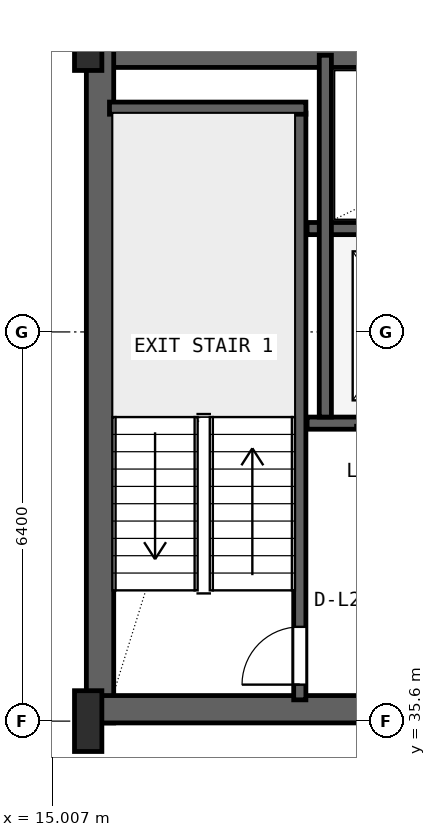
"""IFC4 building model, lengths in metres.
Left out: names, types, materials, properties, quantities, classifications, styles, units other than length and angle.
Written with IfcOpenShell. Run it as: python <this file> out.ifc"""

import sys

from ifc_helpers import new_model, si_unit, direction, frame, frame_2d, origin, origin_2d, place, context, subcontext, project, spatial, rectangle, i_section, extrude, source, transform, mapped, element, fill, save


model = new_model("IFC4")
c1 = context("Model", 3, precision=1e-05, world=origin(), true_north=direction((0.0, 1.0)))
c2 = subcontext(c1, "Body", "Model", "MODEL_VIEW")
j1 = project(units=[si_unit("LENGTHUNIT", "METRE"), si_unit("PLANEANGLEUNIT", "RADIAN")], contexts=[c1])
p1 = place(None, origin())
s1 = spatial("IfcSite", under=j1, at=p1, CompositionType="ELEMENT")
p2 = place(p1, origin())
s2 = spatial("IfcBuilding", under=s1, at=p2, CompositionType="ELEMENT")
p3 = place(p2, frame((0.0, 0.0, 90.8)))
s3 = spatial("IfcBuildingStorey", under=s2, at=p3, CompositionType="ELEMENT", Elevation=90.8)
p4 = place(p3, frame((15.6, 46.575, 0.0), z_axis=(0.0, 0.0, 1.0), x_axis=(1.0, 0.0, 0.0)))
e1 = element("IfcWall", 1, at=p4, inside=s3, PredefinedType="SHEAR", context=c2, shape_type="SweptSolid", body=[
    extrude(rectangle(XDim=36.8, YDim=0.45, at=frame_2d((18.4, 0.0))), origin(), (0.0, 0.0, 1.0), 3.55),
])
p5 = place(p3, frame((15.795, 35.57, 0.0), z_axis=(0.0, 0.0, 1.0), x_axis=(0.0, 1.0, 0.0)))
e2 = element("IfcWall", 2, at=p5, inside=s3, PredefinedType="SHEAR", context=c2, shape_type="SweptSolid", body=[
    extrude(rectangle(XDim=11.23, YDim=0.45, at=frame_2d((5.615, 0.0))), origin(), (0.0, 0.0, 1.0), 3.55),
])
p6 = place(p3, frame((15.57, 35.795, 0.0), z_axis=(0.0, 0.0, 1.0), x_axis=(1.0, 0.0, 0.0)))
e3 = element("IfcWall", 3, at=p6, inside=s3, PredefinedType="SHEAR", context=c2, shape_type="SweptSolid", body=[
    extrude(rectangle(XDim=9.23, YDim=0.45, at=frame_2d((4.615, 0.0))), origin(), (0.0, 0.0, 1.0), 3.55),
])
p7 = place(p6, frame((5.4, 0.0, 0.0)))
e4 = element("IfcOpeningElement", 4, at=p7, cuts=e3, PredefinedType="OPENING", context=c2, shape_type="SweptSolid", body=[
    extrude(rectangle(XDim=1.0, YDim=2.1, at=frame_2d((0.5, 1.05))), frame((0.0, 0.235, 0.0), z_axis=(0.0, -1.0, 0.0), x_axis=(1.0, 0.0, 0.0)), (0.0, 0.0, 1.0), 0.47),
])
m1 = source(origin(), c2, "Body", "SweptSolid", [
    extrude(i_section(OverallWidth=0.45, OverallDepth=1.0, WebThickness=0.016, FlangeThickness=0.03, FilletRadius=0.016, at=origin_2d()), origin(), (0.0, 0.0, 1.0), 3.8),
])
for number, where, z_axis, x_axis in (
    (5, (15.6, 35.6, 0.0), (0.0, 0.0, 1.0), (1.0, 0.0, 0.0)),
    (6, (15.6, 46.8, 0.0), (0.0, 0.0, 1.0), (1.0, 0.0, 0.0)),
):
    element("IfcColumn", number, at=place(p3, frame(where, z_axis=z_axis, x_axis=x_axis)), inside=s3, PredefinedType="COLUMN", context=c2, shape_type="MappedRepresentation", body=[
        mapped(m1, transform((0.0, 0.0, 0.0), x_axis=(1.0, 0.0, 0.0), y_axis=(0.0, 1.0, 0.0), z_axis=(0.0, 0.0, 1.0), scale=1.0)),
    ])
p8 = place(p3, frame((19.08, 35.95, 0.0), z_axis=(0.0, 0.0, 1.0), x_axis=(0.0, 1.0, 0.0)))
e7 = element("IfcWall", 7, at=p8, inside=s3, PredefinedType="SHEAR", context=c2, shape_type="SweptSolid", body=[
    extrude(rectangle(XDim=9.65, YDim=0.2, at=frame_2d((4.825, 0.0))), origin(), (0.0, 0.0, 1.0), 3.55),
])
p9 = place(p8, frame((0.25, 0.0, 0.0)))
e8 = element("IfcOpeningElement", 8, at=p9, cuts=e7, PredefinedType="OPENING", context=c2, shape_type="SweptSolid", body=[
    extrude(rectangle(XDim=0.95, YDim=2.1, at=frame_2d((0.475, 1.05))), frame((0.0, 0.11, 0.0), z_axis=(0.0, -1.0, 0.0), x_axis=(1.0, 0.0, 0.0)), (0.0, 0.0, 1.0), 0.22),
])
p10 = place(p3, frame((15.95, 45.68, 0.0), z_axis=(0.0, 0.0, 1.0), x_axis=(1.0, 0.0, 0.0)))
e9 = element("IfcWall", 9, at=p10, inside=s3, PredefinedType="SHEAR", context=c2, shape_type="SweptSolid", body=[
    extrude(rectangle(XDim=3.23, YDim=0.2, at=frame_2d((1.615, 0.0))), origin(), (0.0, 0.0, 1.0), 3.55),
])
p11 = place(p3, frame((19.2, 40.5, 0.0), z_axis=(0.0, 0.0, 1.0), x_axis=(1.0, 0.0, 0.0)))
e10 = element("IfcWall", 10, at=p11, inside=s3, PredefinedType="SHEAR", context=c2, shape_type="SweptSolid", body=[
    extrude(rectangle(XDim=5.52, YDim=0.2, at=frame_2d((2.76, 0.0))), origin(), (0.0, 0.0, 1.0), 3.55),
])
p12 = place(p11, frame((1.05, 0.0, 0.0)))
e11 = element("IfcOpeningElement", 11, at=p12, cuts=e10, PredefinedType="OPENING", context=c2, shape_type="SweptSolid", body=[
    extrude(rectangle(XDim=1.1, YDim=2.18, at=frame_2d((0.55, 1.09))), frame((0.0, 0.11, 0.0), z_axis=(0.0, -1.0, 0.0), x_axis=(1.0, 0.0, 0.0)), (0.0, 0.0, 1.0), 0.22),
])
p13 = place(p11, frame((3.65, 0.0, 0.0)))
e12 = element("IfcOpeningElement", 12, at=p13, cuts=e10, PredefinedType="OPENING", context=c2, shape_type="SweptSolid", body=[
    extrude(rectangle(XDim=1.1, YDim=2.18, at=frame_2d((0.55, 1.09))), frame((0.0, 0.11, 0.0), z_axis=(0.0, -1.0, 0.0), x_axis=(1.0, 0.0, 0.0)), (0.0, 0.0, 1.0), 0.22),
])
p14 = place(p3, frame((19.2, 43.7, 0.0), z_axis=(0.0, 0.0, 1.0), x_axis=(1.0, 0.0, 0.0)))
e13 = element("IfcWall", 13, at=p14, inside=s3, PredefinedType="SHEAR", context=c2, shape_type="SweptSolid", body=[
    extrude(rectangle(XDim=5.52, YDim=0.2, at=frame_2d((2.76, 0.0))), origin(), (0.0, 0.0, 1.0), 3.55),
])
p15 = place(p3, frame((19.5, 40.6, 0.0), z_axis=(0.0, 0.0, 1.0), x_axis=(0.0, 1.0, 0.0)))
e14 = element("IfcWall", 14, at=p15, inside=s3, PredefinedType="SHEAR", context=c2, shape_type="SweptSolid", body=[
    extrude(rectangle(XDim=5.95, YDim=0.2, at=frame_2d((2.975, 0.0))), origin(), (0.0, 0.0, 1.0), 3.55),
])
m2 = source(origin(), c2, "Body", "SweptSolid", [
    extrude(rectangle(XDim=0.95, YDim=2.1, at=frame_2d((0.475, 1.05))), frame((0.0, 0.025, 0.0), z_axis=(0.0, -1.0, 0.0), x_axis=(1.0, 0.0, 0.0)), (0.0, 0.0, 1.0), 0.05),
])
p16 = place(p9, origin())
e15 = element("IfcDoor", 15, at=p16, inside=s3, OperationType="SINGLE_SWING_LEFT", PredefinedType="DOOR", context=c2, shape_type="MappedRepresentation", body=[
    mapped(m2, transform((0.0, 0.0, 0.0), x_axis=(1.0, 0.0, 0.0), y_axis=(0.0, 1.0, 0.0), z_axis=(0.0, 0.0, 1.0), scale=1.0)),
])
fill(e8, e15)
save(model, sys.argv[1])
